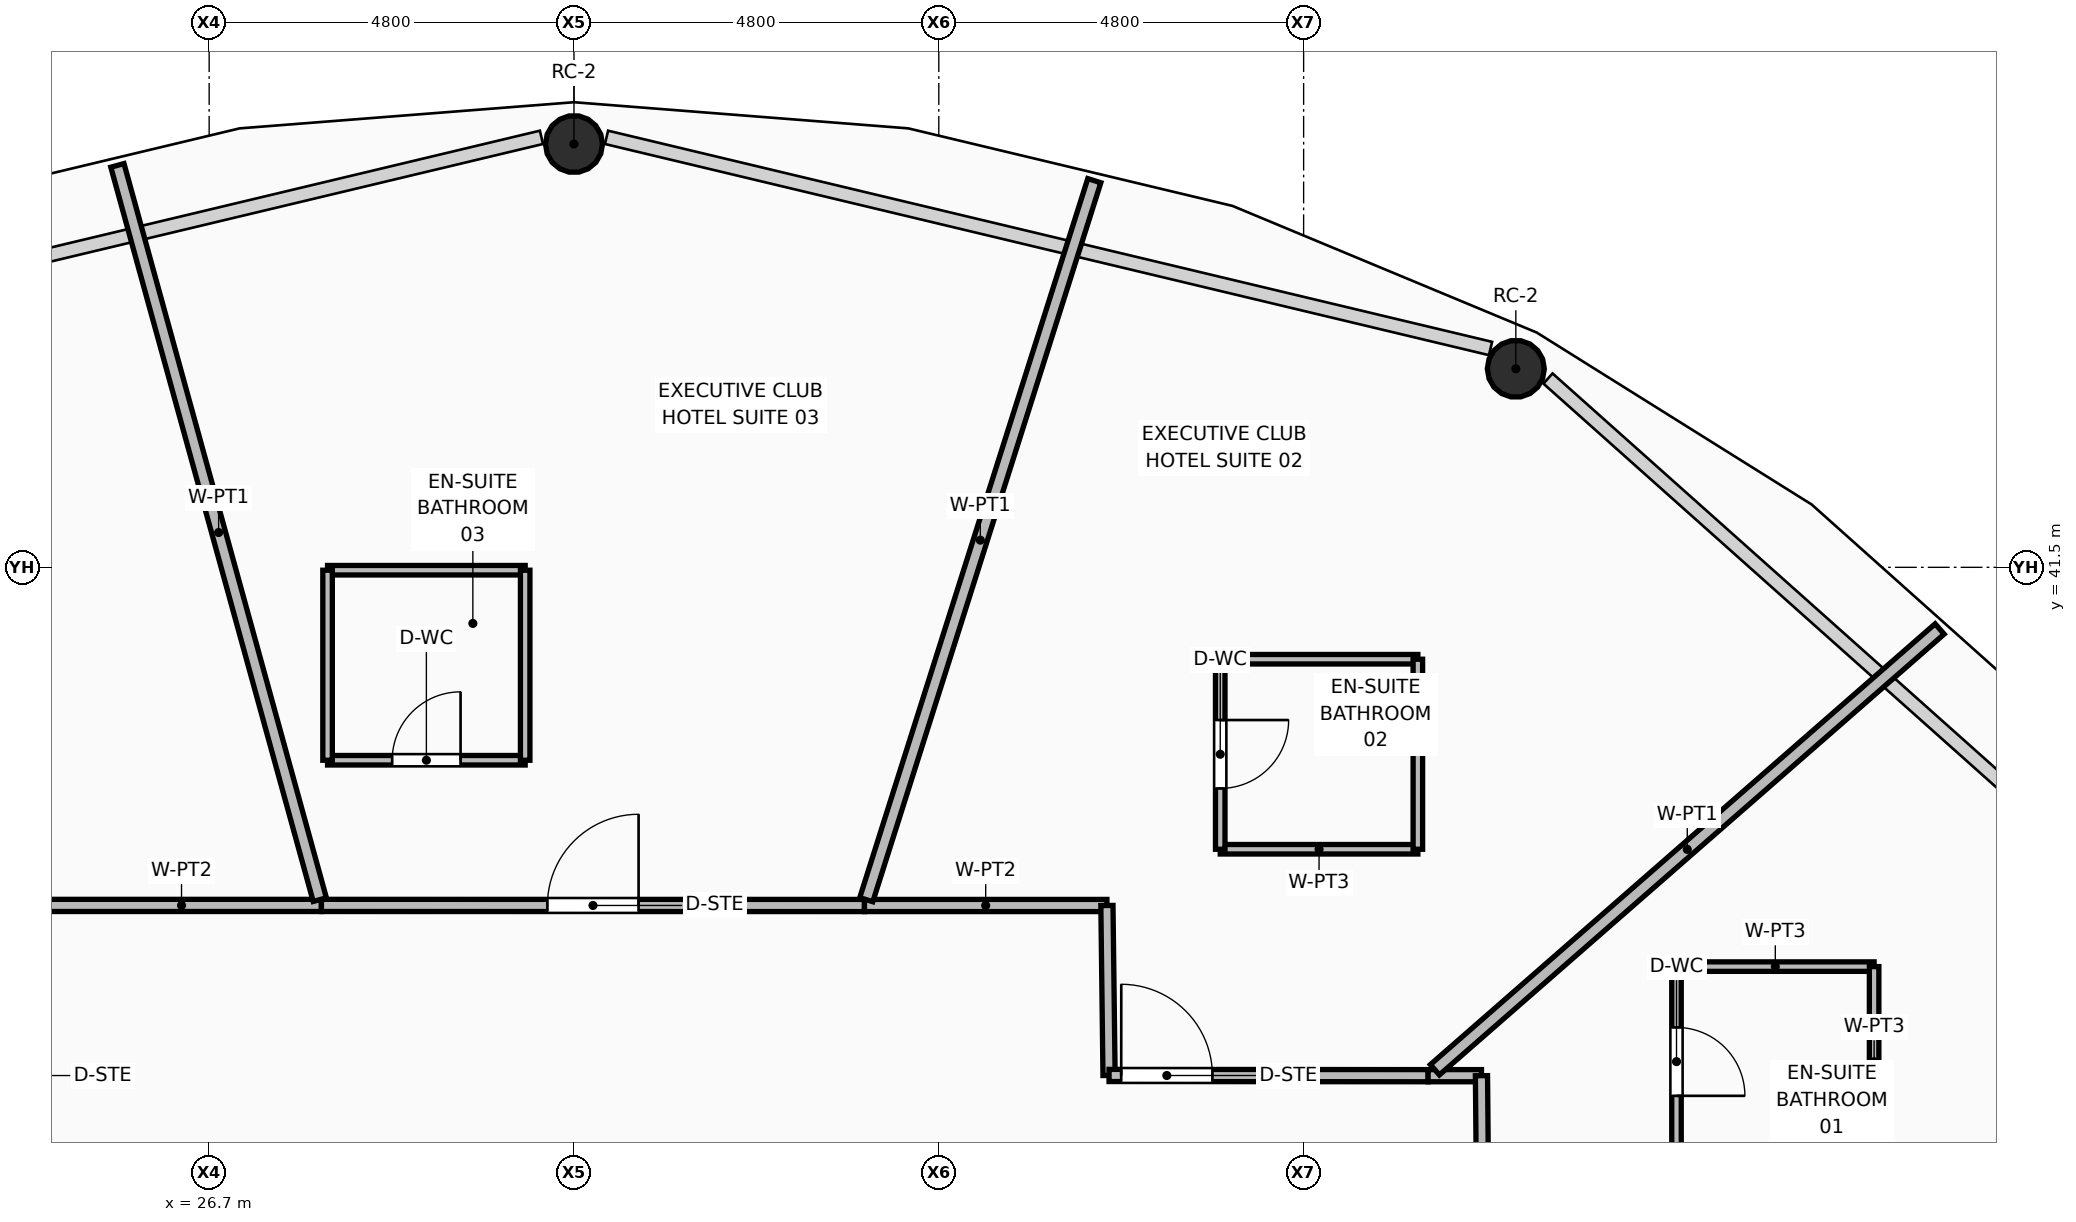
"""IFC4 building model, lengths in metres.
Left out: names, types, materials, properties, quantities, classifications, styles, units other than length and angle.
Written with IfcOpenShell. Run it as: python <this file> out.ifc"""

import sys

from ifc_helpers import new_model, si_unit, direction, frame, frame_2d, origin, origin_2d, place, context, subcontext, project, spatial, rectangle, hollow_circle, extrude, element, fill, save


model = new_model("IFC4")
c1 = context("Model", 3, precision=1e-05, world=origin(), true_north=direction((0.0, 1.0)))
c2 = subcontext(c1, "Body", "Model", "MODEL_VIEW")
j1 = project(units=[si_unit("LENGTHUNIT", "METRE"), si_unit("PLANEANGLEUNIT", "RADIAN")], contexts=[c1])
p1 = place(None, origin())
s1 = spatial("IfcSite", under=j1, at=p1, CompositionType="ELEMENT")
p2 = place(p1, origin())
s2 = spatial("IfcBuilding", under=s1, at=p2, CompositionType="ELEMENT")
p3 = place(p2, frame((0.0, 0.0, 160.95)))
s3 = spatial("IfcBuildingStorey", under=s2, at=p3, CompositionType="ELEMENT", Elevation=160.95)
p4 = place(p3, frame((43.892, 44.112, 0.0), z_axis=(-0.034669243934, -0.053437043308, 0.997969200891), x_axis=(0.838908401488, -0.544272628296, 0.0)))
e1 = element("IfcColumn", 1, at=p4, inside=s3, PredefinedType="COLUMN", context=c2, shape_type="SweptSolid", body=[
    extrude(hollow_circle(Radius=0.375, WallThickness=0.035, at=origin_2d()), origin(), (0.0, 0.0, 1.0), 3.577),
])
p5 = place(p3, frame((31.5, 47.069, 0.0), z_axis=(0.0, -0.061838614669, 0.998086161479), x_axis=(1.0, 0.0, 0.0)))
e2 = element("IfcColumn", 2, at=p5, inside=s3, PredefinedType="COLUMN", context=c2, shape_type="SweptSolid", body=[
    extrude(hollow_circle(Radius=0.375, WallThickness=0.035, at=origin_2d()), origin(), (0.0, 0.0, 1.0), 3.577),
])
p6 = place(p3, frame((24.496, 37.052, 0.0), z_axis=(0.0, 0.0, 1.0), x_axis=(1.0, 0.0, 0.0)))
e3 = element("IfcWall", 3, at=p6, inside=s3, PredefinedType="PARTITIONING", context=c2, shape_type="SweptSolid", body=[
    extrude(rectangle(XDim=3.681, YDim=0.16, at=frame_2d((1.84, 0.0))), origin(), (0.0, 0.0, 1.0), 3.55),
])
p7 = place(p3, frame((28.177, 37.052, 0.0), z_axis=(0.0, 0.0, 1.0), x_axis=(0.99999999066, -0.000136677372, 0.0)))
e4 = element("IfcWall", 4, at=p7, inside=s3, PredefinedType="PARTITIONING", context=c2, shape_type="SweptSolid", body=[
    extrude(rectangle(XDim=7.145, YDim=0.16, at=frame_2d((3.573, 0.0))), origin(), (0.0, 0.0, 1.0), 3.006),
])
p8 = place(p7, frame((2.973, 0.0, 0.0)))
e5 = element("IfcOpeningElement", 5, at=p8, cuts=e4, PredefinedType="OPENING", context=c2, shape_type="SweptSolid", body=[
    extrude(rectangle(XDim=1.2, YDim=2.1, at=frame_2d((0.6, 1.05))), frame((0.0, 0.09, 0.0), z_axis=(0.0, -1.0, 0.0), x_axis=(1.0, 0.0, 0.0)), (0.0, 0.0, 1.0), 0.18),
])
p9 = place(p3, frame((35.322, 37.051, 0.0), z_axis=(0.0, 0.0, 1.0), x_axis=(1.0, 0.0, 0.0)))
e6 = element("IfcWall", 6, at=p9, inside=s3, PredefinedType="PARTITIONING", context=c2, shape_type="SweptSolid", body=[
    extrude(rectangle(XDim=3.19, YDim=0.16, at=frame_2d((1.595, 0.0))), origin(), (0.0, 0.0, 1.0), 3.55),
])
p10 = place(p3, frame((38.512, 37.051, 0.0), z_axis=(0.0, 0.0, 1.0), x_axis=(0.012554966271, -0.999921183305, 0.0)))
e7 = element("IfcWall", 7, at=p10, inside=s3, PredefinedType="PARTITIONING", context=c2, shape_type="SweptSolid", body=[
    extrude(rectangle(XDim=2.236, YDim=0.16, at=frame_2d((1.118, 0.0))), origin(), (0.0, 0.0, 1.0), 3.55),
])
p11 = place(p3, frame((38.54, 34.815, 0.0), z_axis=(0.0, 0.0, 1.0), x_axis=(0.999999756484, -0.00069787712, 0.0)))
e8 = element("IfcWall", 8, at=p11, inside=s3, PredefinedType="PARTITIONING", context=c2, shape_type="SweptSolid", body=[
    extrude(rectangle(XDim=4.198, YDim=0.16, at=frame_2d((2.099, 0.0))), origin(), (0.0, 0.0, 1.0), 3.006),
])
p12 = place(p11, frame((0.16, 0.0, 0.0)))
e9 = element("IfcOpeningElement", 9, at=p12, cuts=e8, PredefinedType="OPENING", context=c2, shape_type="SweptSolid", body=[
    extrude(rectangle(XDim=1.2, YDim=2.1, at=frame_2d((0.6, 1.05))), frame((0.0, 0.09, 0.0), z_axis=(0.0, -1.0, 0.0), x_axis=(1.0, 0.0, 0.0)), (0.0, 0.0, 1.0), 0.18),
])
p13 = place(p3, frame((42.738, 34.812, 0.0), z_axis=(0.0, 0.0, 1.0), x_axis=(1.0, 0.0, 0.0)))
e10 = element("IfcWall", 10, at=p13, inside=s3, PredefinedType="PARTITIONING", context=c2, shape_type="SweptSolid", body=[
    extrude(rectangle(XDim=0.702, YDim=0.16, at=frame_2d((0.351, 0.0))), origin(), (0.0, 0.0, 1.0), 3.55),
])
p14 = place(p3, frame((43.44, 34.812, 0.0), z_axis=(0.0, 0.0, 1.0), x_axis=(0.009071319538, -0.999958854734, 0.0)))
e11 = element("IfcWall", 11, at=p14, inside=s3, PredefinedType="PARTITIONING", context=c2, shape_type="SweptSolid", body=[
    extrude(rectangle(XDim=2.772, YDim=0.16, at=frame_2d((1.386, 0.0))), origin(), (0.0, 0.0, 1.0), 3.006),
])
p15 = place(p3, frame((42.827, 34.89, 0.0), z_axis=(0.0, 0.0, 1.0), x_axis=(0.753245296601, 0.657739707748, 0.0)))
e12 = element("IfcWall", 12, at=p15, inside=s3, PredefinedType="PARTITIONING", context=c2, shape_type="SweptSolid", body=[
    extrude(rectangle(XDim=8.817, YDim=0.18, at=frame_2d((4.408, 0.0))), origin(), (0.0, 0.0, 1.0), 2.852),
])
p16 = place(p3, frame((35.346, 37.128, 0.0), z_axis=(0.0, 0.0, 1.0), x_axis=(0.302318013696, 0.95320712261, 0.0)))
e13 = element("IfcWall", 13, at=p16, inside=s3, PredefinedType="PARTITIONING", context=c2, shape_type="SweptSolid", body=[
    extrude(rectangle(XDim=9.923, YDim=0.18, at=frame_2d((4.962, 0.0))), origin(), (0.0, 0.0, 1.0), 2.852),
])
p17 = place(p3, frame((28.156, 37.128, 0.0), z_axis=(0.0, 0.0, 1.0), x_axis=(-0.265763479933, 0.964038263107, 0.0)))
e14 = element("IfcWall", 14, at=p17, inside=s3, PredefinedType="PARTITIONING", context=c2, shape_type="SweptSolid", body=[
    extrude(rectangle(XDim=10.021, YDim=0.18, at=frame_2d((5.01, 0.0))), origin(), (0.0, 0.0, 1.0), 2.852),
])
p18 = place(p3, frame((46.006, 36.247, 0.0), z_axis=(0.0, 0.0, 1.0), x_axis=(1.0, 0.0, 0.0)))
e15 = element("IfcWall", 15, at=p18, inside=s3, PredefinedType="PARTITIONING", context=c2, shape_type="SweptSolid", body=[
    extrude(rectangle(XDim=2.6, YDim=0.125, at=frame_2d((1.3, 0.0))), origin(), (0.0, 0.0, 1.0), 3.55),
])
p19 = place(p3, frame((46.006, 33.747, 0.0), z_axis=(0.0, 0.0, 1.0), x_axis=(0.0, 1.0, 0.0)))
e16 = element("IfcWall", 16, at=p19, inside=s3, PredefinedType="PARTITIONING", context=c2, shape_type="SweptSolid", body=[
    extrude(rectangle(XDim=2.5, YDim=0.125, at=frame_2d((1.25, 0.0))), origin(), (0.0, 0.0, 1.0), 3.006),
])
p20 = place(p19, frame((0.8, 0.0, 0.0)))
e17 = element("IfcOpeningElement", 17, at=p20, cuts=e16, PredefinedType="OPENING", context=c2, shape_type="SweptSolid", body=[
    extrude(rectangle(XDim=0.9, YDim=2.1, at=frame_2d((0.45, 1.05))), frame((0.0, 0.073, 0.0), z_axis=(0.0, -1.0, 0.0), x_axis=(1.0, 0.0, 0.0)), (0.0, 0.0, 1.0), 0.145),
])
p21 = place(p3, frame((48.606, 33.747, 0.0), z_axis=(0.0, 0.0, 1.0), x_axis=(0.0, 1.0, 0.0)))
e18 = element("IfcWall", 18, at=p21, inside=s3, PredefinedType="PARTITIONING", context=c2, shape_type="SweptSolid", body=[
    extrude(rectangle(XDim=2.5, YDim=0.125, at=frame_2d((1.25, 0.0))), origin(), (0.0, 0.0, 1.0), 3.006),
])
p22 = place(p3, frame((40.003, 37.791, 0.0), z_axis=(0.0, 0.0, 1.0), x_axis=(1.0, 0.0, 0.0)))
e19 = element("IfcWall", 19, at=p22, inside=s3, PredefinedType="PARTITIONING", context=c2, shape_type="SweptSolid", body=[
    extrude(rectangle(XDim=2.6, YDim=0.125, at=frame_2d((1.3, 0.0))), origin(), (0.0, 0.0, 1.0), 3.006),
])
p23 = place(p3, frame((40.003, 40.291, 0.0), z_axis=(0.0, 0.0, 1.0), x_axis=(1.0, 0.0, 0.0)))
e20 = element("IfcWall", 20, at=p23, inside=s3, PredefinedType="PARTITIONING", context=c2, shape_type="SweptSolid", body=[
    extrude(rectangle(XDim=2.6, YDim=0.125, at=frame_2d((1.3, 0.0))), origin(), (0.0, 0.0, 1.0), 3.55),
])
p24 = place(p3, frame((40.003, 37.791, 0.0), z_axis=(0.0, 0.0, 1.0), x_axis=(0.0, 1.0, 0.0)))
e21 = element("IfcWall", 21, at=p24, inside=s3, PredefinedType="PARTITIONING", context=c2, shape_type="SweptSolid", body=[
    extrude(rectangle(XDim=2.5, YDim=0.125, at=frame_2d((1.25, 0.0))), origin(), (0.0, 0.0, 1.0), 3.55),
])
p25 = place(p24, frame((0.8, 0.0, 0.0)))
e22 = element("IfcOpeningElement", 22, at=p25, cuts=e21, PredefinedType="OPENING", context=c2, shape_type="SweptSolid", body=[
    extrude(rectangle(XDim=0.9, YDim=2.1, at=frame_2d((0.45, 1.05))), frame((0.0, 0.073, 0.0), z_axis=(0.0, -1.0, 0.0), x_axis=(1.0, 0.0, 0.0)), (0.0, 0.0, 1.0), 0.145),
])
p26 = place(p3, frame((42.603, 37.791, 0.0), z_axis=(0.0, 0.0, 1.0), x_axis=(0.0, 1.0, 0.0)))
e23 = element("IfcWall", 23, at=p26, inside=s3, PredefinedType="PARTITIONING", context=c2, shape_type="SweptSolid", body=[
    extrude(rectangle(XDim=2.5, YDim=0.125, at=frame_2d((1.25, 0.0))), origin(), (0.0, 0.0, 1.0), 3.006),
])
p27 = place(p3, frame((28.258, 38.962, 0.0), z_axis=(0.0, 0.0, 1.0), x_axis=(1.0, 0.0, 0.0)))
e24 = element("IfcWall", 24, at=p27, inside=s3, PredefinedType="PARTITIONING", context=c2, shape_type="SweptSolid", body=[
    extrude(rectangle(XDim=2.6, YDim=0.125, at=frame_2d((1.3, 0.0))), origin(), (0.0, 0.0, 1.0), 3.55),
])
p28 = place(p27, frame((0.85, 0.0, 0.0)))
e25 = element("IfcOpeningElement", 25, at=p28, cuts=e24, PredefinedType="OPENING", context=c2, shape_type="SweptSolid", body=[
    extrude(rectangle(XDim=0.9, YDim=2.1, at=frame_2d((0.45, 1.05))), frame((0.0, 0.073, 0.0), z_axis=(0.0, -1.0, 0.0), x_axis=(1.0, 0.0, 0.0)), (0.0, 0.0, 1.0), 0.145),
])
p29 = place(p3, frame((28.258, 41.462, 0.0), z_axis=(0.0, 0.0, 1.0), x_axis=(1.0, 0.0, 0.0)))
e26 = element("IfcWall", 26, at=p29, inside=s3, PredefinedType="PARTITIONING", context=c2, shape_type="SweptSolid", body=[
    extrude(rectangle(XDim=2.6, YDim=0.125, at=frame_2d((1.3, 0.0))), origin(), (0.0, 0.0, 1.0), 3.55),
])
for number, where, z_axis, x_axis in (
    (27, (28.258, 38.962, 0.0), (0.0, 0.0, 1.0), (0.0, 1.0, 0.0)),
    (28, (30.858, 38.962, 0.0), (0.0, 0.0, 1.0), (0.0, 1.0, 0.0)),
):
    element("IfcWall", number, at=place(p3, frame(where, z_axis=z_axis, x_axis=x_axis)), inside=s3, PredefinedType="PARTITIONING", context=c2, shape_type="SweptSolid", body=[
        extrude(rectangle(XDim=2.5, YDim=0.125, at=frame_2d((1.25, 0.0))), origin(), (0.0, 0.0, 1.0), 3.55),
    ])
p30 = place(p20, frame((0.9, 0.0, 0.0), z_axis=(0.0, 0.0, 1.0), x_axis=(-1.0, 0.0, 0.0)))
e29 = element("IfcDoor", 29, at=p30, inside=s3, OperationType="SINGLE_SWING_RIGHT", PredefinedType="DOOR", context=c2, shape_type="SweptSolid", body=[
    extrude(rectangle(XDim=0.9, YDim=2.1, at=frame_2d((0.45, 1.05))), frame((0.0, 0.025, 0.0), z_axis=(0.0, -1.0, 0.0), x_axis=(1.0, 0.0, 0.0)), (0.0, 0.0, 1.0), 0.05),
])
fill(e17, e29)
p31 = place(p25, frame((0.9, 0.0, 0.0), z_axis=(0.0, 0.0, 1.0), x_axis=(-1.0, 0.0, 0.0)))
e30 = element("IfcDoor", 30, at=p31, inside=s3, OperationType="SINGLE_SWING_LEFT", PredefinedType="DOOR", context=c2, shape_type="SweptSolid", body=[
    extrude(rectangle(XDim=0.9, YDim=2.1, at=frame_2d((0.45, 1.05))), frame((0.0, 0.025, 0.0), z_axis=(0.0, -1.0, 0.0), x_axis=(1.0, 0.0, 0.0)), (0.0, 0.0, 1.0), 0.05),
])
fill(e22, e30)
p32 = place(p12, origin())
e31 = element("IfcDoor", 31, at=p32, inside=s3, OperationType="SINGLE_SWING_LEFT", PredefinedType="DOOR", context=c2, shape_type="SweptSolid", body=[
    extrude(rectangle(XDim=1.2, YDim=2.1, at=frame_2d((0.6, 1.05))), frame((0.0, 0.025, 0.0), z_axis=(0.0, -1.0, 0.0), x_axis=(1.0, 0.0, 0.0)), (0.0, 0.0, 1.0), 0.05),
])
fill(e9, e31)
p33 = place(p28, origin())
e32 = element("IfcDoor", 32, at=p33, inside=s3, OperationType="SINGLE_SWING_RIGHT", PredefinedType="DOOR", context=c2, shape_type="SweptSolid", body=[
    extrude(rectangle(XDim=0.9, YDim=2.1, at=frame_2d((0.45, 1.05))), frame((0.0, 0.025, 0.0), z_axis=(0.0, -1.0, 0.0), x_axis=(1.0, 0.0, 0.0)), (0.0, 0.0, 1.0), 0.05),
])
fill(e25, e32)
p34 = place(p8, origin())
e33 = element("IfcDoor", 33, at=p34, inside=s3, OperationType="SINGLE_SWING_RIGHT", PredefinedType="DOOR", context=c2, shape_type="SweptSolid", body=[
    extrude(rectangle(XDim=1.2, YDim=2.1, at=frame_2d((0.6, 1.05))), frame((0.0, 0.025, 0.0), z_axis=(0.0, -1.0, 0.0), x_axis=(1.0, 0.0, 0.0)), (0.0, 0.0, 1.0), 0.05),
])
fill(e5, e33)
save(model, sys.argv[1])
